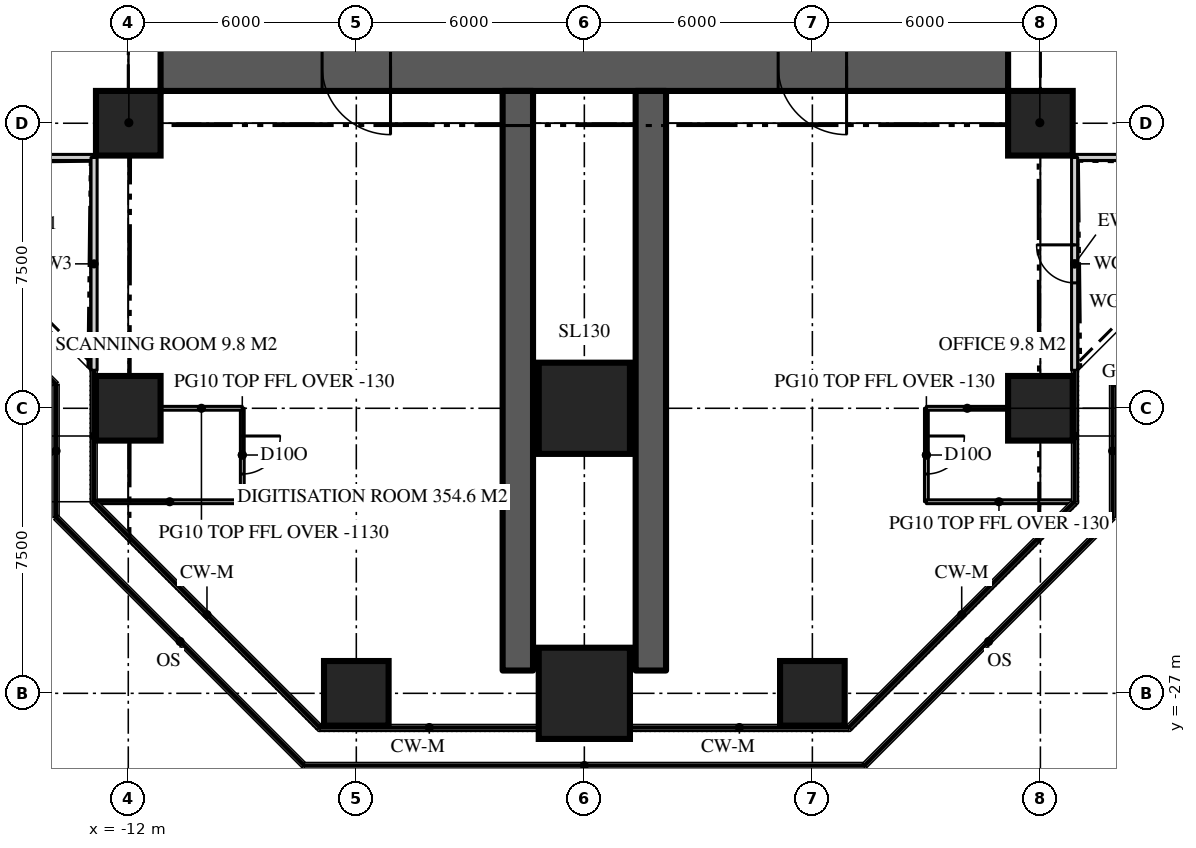
"""IFC4 building model, lengths in metres.
Left out: names, types, materials, properties, quantities, classifications, styles, units other than length and angle.
Written with IfcOpenShell. Run it as: python <this file> out.ifc"""

import sys

from ifc_helpers import new_model, si_unit, direction, frame, frame_2d, origin, origin_2d, place, context, subcontext, project, spatial, rectangle, extrude, element, fill, save


model = new_model("IFC4")
c1 = context("Model", 3, precision=1e-05, world=origin(), true_north=direction((0.0, 1.0)))
c2 = subcontext(c1, "Body", "Model", "MODEL_VIEW")
j1 = project(units=[si_unit("LENGTHUNIT", "METRE"), si_unit("PLANEANGLEUNIT", "RADIAN")], contexts=[c1])
p1 = place(None, origin())
s1 = spatial("IfcSite", under=j1, at=p1, CompositionType="ELEMENT")
p2 = place(p1, origin())
s2 = spatial("IfcBuilding", under=s1, at=p2, CompositionType="ELEMENT")
p3 = place(p2, frame((0.0, 0.0, 163.2)))
s3 = spatial("IfcBuildingStorey", under=s2, at=p3, CompositionType="ELEMENT", Elevation=163.2)
p4 = place(p3, frame((11.15, -10.5, 0.0), z_axis=(0.0, 0.0, 1.0), x_axis=(-1.0, 0.0, 0.0)))
e1 = element("IfcWall", 1, at=p4, inside=s3, PredefinedType="SHEAR", context=c2, shape_type="SweptSolid", body=[
    extrude(rectangle(XDim=22.3, YDim=1.3, at=frame_2d((11.15, 0.0))), origin(), (0.0, 0.0, 1.0), 3.9),
])
p5 = place(p4, frame((16.25, 0.0, 0.0)))
e2 = element("IfcOpeningElement", 2, at=p5, cuts=e1, PredefinedType="OPENING", context=c2, shape_type="SweptSolid", body=[
    extrude(rectangle(XDim=1.8, YDim=2.2, at=frame_2d((0.9, 1.1))), frame((0.0, 0.66, 0.0), z_axis=(0.0, -1.0, 0.0), x_axis=(1.0, 0.0, 0.0)), (0.0, 0.0, 1.0), 1.32),
])
p6 = place(p4, frame((4.25, 0.0, 0.0)))
e3 = element("IfcOpeningElement", 3, at=p6, cuts=e1, PredefinedType="OPENING", context=c2, shape_type="SweptSolid", body=[
    extrude(rectangle(XDim=1.8, YDim=2.2, at=frame_2d((0.9, 1.1))), frame((0.0, 0.66, 0.0), z_axis=(0.0, -1.0, 0.0), x_axis=(1.0, 0.0, 0.0)), (0.0, 0.0, 1.0), 1.32),
])
for number, where, z_axis, x_axis in (
    (4, (-1.75, -11.15, 0.0), (0.0, 0.0, 1.0), (0.0, -1.0, 0.0)),
    (5, (1.75, -11.15, 0.0), (0.0, 0.0, 1.0), (0.0, -1.0, 0.0)),
):
    element("IfcWall", number, at=place(p3, frame(where, z_axis=z_axis, x_axis=x_axis)), inside=s3, PredefinedType="SHEAR", context=c2, shape_type="SweptSolid", body=[
        extrude(rectangle(XDim=15.25, YDim=0.8, at=frame_2d((7.625, 0.0))), origin(), (0.0, 0.0, 1.0), 3.9),
    ])
p7 = place(p3, frame((-6.0, -27.0, 0.0), z_axis=(0.0, 0.0, 1.0), x_axis=(1.0, 0.0, 0.0)))
e6 = element("IfcColumn", 6, at=p7, inside=s3, PredefinedType="COLUMN", context=c2, shape_type="SweptSolid", body=[
    extrude(rectangle(XDim=1.7, YDim=1.7, at=origin_2d()), origin(), (0.0, 0.0, 1.0), 3.9),
])
p8 = place(p3, frame((0.0, -27.0, 0.0), z_axis=(0.0, 0.0, 1.0), x_axis=(1.0, 0.0, 0.0)))
e7 = element("IfcColumn", 7, at=p8, inside=s3, PredefinedType="COLUMN", context=c2, shape_type="SweptSolid", body=[
    extrude(rectangle(XDim=2.4, YDim=2.4, at=origin_2d()), origin(), (0.0, 0.0, 1.0), 3.9),
])
for number, where, z_axis, x_axis in (
    (8, (6.0, -27.0, 0.0), (0.0, 0.0, 1.0), (1.0, 0.0, 0.0)),
    (9, (-12.0, -19.5, 0.0), (0.0, 0.0, 1.0), (1.0, 0.0, 0.0)),
):
    element("IfcColumn", number, at=place(p3, frame(where, z_axis=z_axis, x_axis=x_axis)), inside=s3, PredefinedType="COLUMN", context=c2, shape_type="SweptSolid", body=[
        extrude(rectangle(XDim=1.7, YDim=1.7, at=origin_2d()), origin(), (0.0, 0.0, 1.0), 3.9),
    ])
p9 = place(p3, frame((0.0, -19.5, 0.0), z_axis=(0.0, 0.0, 1.0), x_axis=(1.0, 0.0, 0.0)))
e10 = element("IfcColumn", 10, at=p9, inside=s3, PredefinedType="COLUMN", context=c2, shape_type="SweptSolid", body=[
    extrude(rectangle(XDim=2.4, YDim=2.4, at=origin_2d()), origin(), (0.0, 0.0, 1.0), 3.9),
])
for number, where, z_axis, x_axis in (
    (11, (12.0, -19.5, 0.0), (0.0, 0.0, 1.0), (1.0, 0.0, 0.0)),
    (12, (-12.0, -12.0, 0.0), (0.0, 0.0, 1.0), (1.0, 0.0, 0.0)),
    (13, (12.0, -12.0, 0.0), (0.0, 0.0, 1.0), (1.0, 0.0, 0.0)),
):
    element("IfcColumn", number, at=place(p3, frame(where, z_axis=z_axis, x_axis=x_axis)), inside=s3, PredefinedType="COLUMN", context=c2, shape_type="SweptSolid", body=[
        extrude(rectangle(XDim=1.7, YDim=1.7, at=origin_2d()), origin(), (0.0, 0.0, 1.0), 3.9),
    ])
p10 = place(p3, frame((12.9, -12.9, 0.0), z_axis=(0.0, 0.0, 1.0), x_axis=(1.0, 0.0, 0.0)))
e14 = element("IfcWall", 14, at=p10, inside=s3, PredefinedType="SOLIDWALL", context=c2, shape_type="SweptSolid", body=[
    extrude(rectangle(XDim=5.6, YDim=0.16, at=frame_2d((2.8, 0.0))), origin(), (0.0, 0.0, 1.0), 3.77),
])
p11 = place(p3, frame((-18.5, -12.9, 0.0), z_axis=(0.0, 0.0, 1.0), x_axis=(1.0, 0.0, 0.0)))
e15 = element("IfcWall", 15, at=p11, inside=s3, PredefinedType="SOLIDWALL", context=c2, shape_type="SweptSolid", body=[
    extrude(rectangle(XDim=5.6, YDim=0.16, at=frame_2d((2.8, 0.0))), origin(), (0.0, 0.0, 1.0), 3.77),
])
p12 = place(p11, frame((2.3, 0.0, 0.0)))
e16 = element("IfcOpeningElement", 16, at=p12, cuts=e15, PredefinedType="OPENING", context=c2, shape_type="SweptSolid", body=[
    extrude(rectangle(XDim=1.0, YDim=2.2, at=frame_2d((0.5, 1.1))), frame((0.0, 0.09, 0.0), z_axis=(0.0, -1.0, 0.0), x_axis=(1.0, 0.0, 0.0)), (0.0, 0.0, 1.0), 0.18),
])
p13 = place(p3, frame((-12.9, -12.9, 0.0), z_axis=(0.0, 0.0, 1.0), x_axis=(0.0, -1.0, 0.0)))
e17 = element("IfcWall", 17, at=p13, inside=s3, PredefinedType="SOLIDWALL", context=c2, shape_type="SweptSolid", body=[
    extrude(rectangle(XDim=5.6, YDim=0.16, at=frame_2d((2.8, 0.0))), origin(), (0.0, 0.0, 1.0), 3.77),
])
p14 = place(p3, frame((12.9, -18.5, 0.0), z_axis=(0.0, 0.0, 1.0), x_axis=(0.0, 1.0, 0.0)))
e18 = element("IfcWall", 18, at=p14, inside=s3, PredefinedType="SOLIDWALL", context=c2, shape_type="SweptSolid", body=[
    extrude(rectangle(XDim=5.6, YDim=0.16, at=frame_2d((2.8, 0.0))), origin(), (0.0, 0.0, 1.0), 3.77),
])
p15 = place(p14, frame((2.3, 0.0, 0.0)))
e19 = element("IfcOpeningElement", 19, at=p15, cuts=e18, PredefinedType="OPENING", context=c2, shape_type="SweptSolid", body=[
    extrude(rectangle(XDim=1.0, YDim=2.2, at=frame_2d((0.5, 1.1))), frame((0.0, 0.09, 0.0), z_axis=(0.0, -1.0, 0.0), x_axis=(1.0, 0.0, 0.0)), (0.0, 0.0, 1.0), 0.18),
])
p16 = place(p3, frame((9.0, -19.5, 0.0), z_axis=(0.0, 0.0, 1.0), x_axis=(0.0, -1.0, 0.0)))
e20 = element("IfcWall", 20, at=p16, inside=s3, PredefinedType="PARTITIONING", context=c2, shape_type="SweptSolid", body=[
    extrude(rectangle(XDim=2.459, YDim=0.1, at=frame_2d((1.229, 0.0))), origin(), (0.0, 0.0, 1.0), 3.77),
])
p17 = place(p16, frame((0.729, 0.0, 0.0)))
e21 = element("IfcOpeningElement", 21, at=p17, cuts=e20, PredefinedType="OPENING", context=c2, shape_type="SweptSolid", body=[
    extrude(rectangle(XDim=1.0, YDim=2.2, at=frame_2d((0.5, 1.1))), frame((0.0, 0.06, 0.0), z_axis=(0.0, -1.0, 0.0), x_axis=(1.0, 0.0, 0.0)), (0.0, 0.0, 1.0), 0.12),
])
p18 = place(p3, frame((9.0, -19.5, 0.0), z_axis=(0.0, 0.0, 1.0), x_axis=(1.0, 0.0, 0.0)))
e22 = element("IfcWall", 22, at=p18, inside=s3, PredefinedType="PARTITIONING", context=c2, shape_type="SweptSolid", body=[
    extrude(rectangle(XDim=2.15, YDim=0.1, at=frame_2d((1.075, 0.0))), origin(), (0.0, 0.0, 1.0), 2.77),
])
p19 = place(p3, frame((9.0, -21.959, 0.0), z_axis=(0.0, 0.0, 1.0), x_axis=(1.0, 0.0, 0.0)))
e23 = element("IfcWall", 23, at=p19, inside=s3, PredefinedType="PARTITIONING", context=c2, shape_type="SweptSolid", body=[
    extrude(rectangle(XDim=3.82, YDim=0.1, at=frame_2d((1.91, 0.0))), origin(), (0.0, 0.0, 1.0), 3.77),
])
p20 = place(p3, frame((-9.0, -19.5, 0.0), z_axis=(0.0, 0.0, 1.0), x_axis=(0.0, -1.0, 0.0)))
e24 = element("IfcWall", 24, at=p20, inside=s3, PredefinedType="PARTITIONING", context=c2, shape_type="SweptSolid", body=[
    extrude(rectangle(XDim=2.459, YDim=0.1, at=frame_2d((1.229, 0.0))), origin(), (0.0, 0.0, 1.0), 3.77),
])
p21 = place(p20, frame((0.729, 0.0, 0.0)))
e25 = element("IfcOpeningElement", 25, at=p21, cuts=e24, PredefinedType="OPENING", context=c2, shape_type="SweptSolid", body=[
    extrude(rectangle(XDim=1.0, YDim=2.2, at=frame_2d((0.5, 1.1))), frame((0.0, 0.06, 0.0), z_axis=(0.0, -1.0, 0.0), x_axis=(1.0, 0.0, 0.0)), (0.0, 0.0, 1.0), 0.12),
])
p22 = place(p3, frame((-9.0, -19.5, 0.0), z_axis=(0.0, 0.0, 1.0), x_axis=(-1.0, 0.0, 0.0)))
e26 = element("IfcWall", 26, at=p22, inside=s3, PredefinedType="PARTITIONING", context=c2, shape_type="SweptSolid", body=[
    extrude(rectangle(XDim=2.15, YDim=0.1, at=frame_2d((1.075, 0.0))), origin(), (0.0, 0.0, 1.0), 2.77),
])
p23 = place(p3, frame((-9.0, -21.959, 0.0), z_axis=(0.0, 0.0, 1.0), x_axis=(-1.0, 0.0, 0.0)))
e27 = element("IfcWall", 27, at=p23, inside=s3, PredefinedType="PARTITIONING", context=c2, shape_type="SweptSolid", body=[
    extrude(rectangle(XDim=3.82, YDim=0.1, at=frame_2d((1.91, 0.0))), origin(), (0.0, 0.0, 1.0), 3.77),
])
for number, where, z_axis, x_axis in (
    (28, (-11.15, -11.15, 0.0), (0.0, 0.0, 1.0), (-0.707, -0.707, 0.0)),
    (29, (11.15, -11.15, 0.0), (0.0, 0.0, 1.0), (0.707, -0.707, 0.0)),
):
    element("IfcWall", number, at=place(p3, frame(where, z_axis=z_axis, x_axis=x_axis)), inside=s3, PredefinedType="PARTITIONING", context=c2, shape_type="SweptSolid", body=[
        extrude(rectangle(XDim=2.362, YDim=0.15, at=frame_2d((1.181, 0.0))), origin(), (0.0, 0.0, 1.0), 3.22),
    ])
p24 = place(p15, origin())
e30 = element("IfcDoor", 30, at=p24, inside=s3, OperationType="SINGLE_SWING_RIGHT", PredefinedType="DOOR", context=c2, shape_type="SweptSolid", body=[
    extrude(rectangle(XDim=1.0, YDim=2.2, at=frame_2d((0.5, 1.1))), frame((0.0, 0.025, 0.0), z_axis=(0.0, -1.0, 0.0), x_axis=(1.0, 0.0, 0.0)), (0.0, 0.0, 1.0), 0.05),
])
fill(e19, e30)
p25 = place(p5, origin())
e31 = element("IfcDoor", 31, at=p25, inside=s3, OperationType="DOUBLE_DOOR_DOUBLE_SWING", PredefinedType="DOOR", context=c2, shape_type="SweptSolid", body=[
    extrude(rectangle(XDim=1.8, YDim=2.2, at=frame_2d((0.9, 1.1))), frame((0.0, 0.025, 0.0), z_axis=(0.0, -1.0, 0.0), x_axis=(1.0, 0.0, 0.0)), (0.0, 0.0, 1.0), 0.05),
])
fill(e2, e31)
p26 = place(p6, origin())
e32 = element("IfcDoor", 32, at=p26, inside=s3, OperationType="DOUBLE_DOOR_DOUBLE_SWING", PredefinedType="DOOR", context=c2, shape_type="SweptSolid", body=[
    extrude(rectangle(XDim=1.8, YDim=2.2, at=frame_2d((0.9, 1.1))), frame((0.0, 0.025, 0.0), z_axis=(0.0, -1.0, 0.0), x_axis=(1.0, 0.0, 0.0)), (0.0, 0.0, 1.0), 0.05),
])
fill(e3, e32)
p27 = place(p17, origin())
e33 = element("IfcDoor", 33, at=p27, inside=s3, OperationType="SINGLE_SWING_LEFT", PredefinedType="DOOR", context=c2, shape_type="SweptSolid", body=[
    extrude(rectangle(XDim=1.0, YDim=2.2, at=frame_2d((0.5, 1.1))), frame((0.0, 0.025, 0.0), z_axis=(0.0, -1.0, 0.0), x_axis=(1.0, 0.0, 0.0)), (0.0, 0.0, 1.0), 0.05),
])
fill(e21, e33)
p28 = place(p21, origin())
e34 = element("IfcDoor", 34, at=p28, inside=s3, OperationType="SINGLE_SWING_LEFT", PredefinedType="DOOR", context=c2, shape_type="SweptSolid", body=[
    extrude(rectangle(XDim=1.0, YDim=2.2, at=frame_2d((0.5, 1.1))), frame((0.0, 0.025, 0.0), z_axis=(0.0, -1.0, 0.0), x_axis=(1.0, 0.0, 0.0)), (0.0, 0.0, 1.0), 0.05),
])
fill(e25, e34)
save(model, sys.argv[1])
